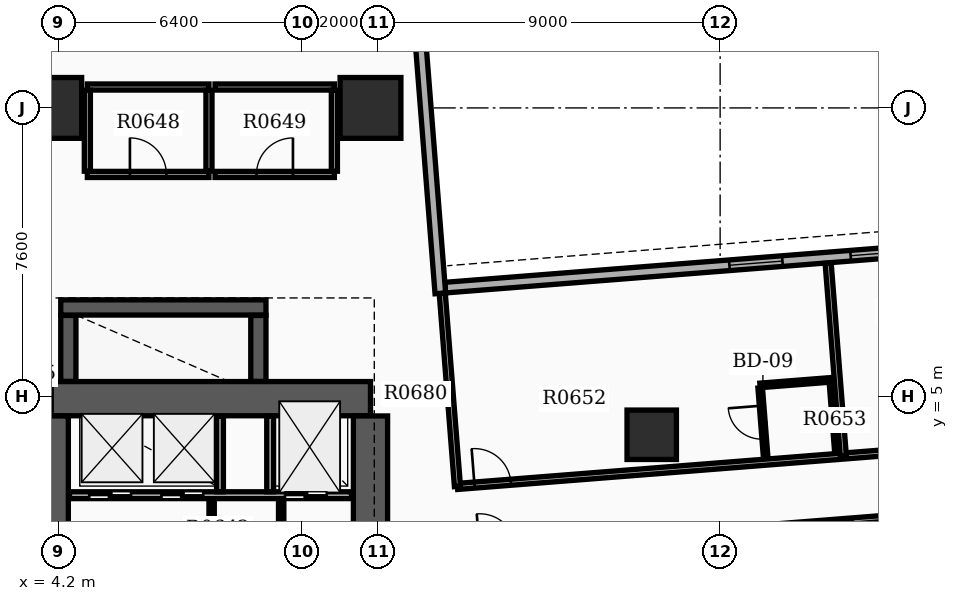
"""IFC4 building model, lengths in metres.
Left out: names, types, materials, properties, quantities, classifications, styles, units other than length and angle.
Written with IfcOpenShell. Run it as: python <this file> out.ifc"""

import sys

from ifc_helpers import new_model, si_unit, direction, frame, frame_2d, origin, origin_2d, place, context, subcontext, project, spatial, rectangle, extrude, element, fill, save


model = new_model("IFC4")
c1 = context("Model", 3, precision=1e-05, world=origin(), true_north=direction((0.0, 1.0)))
c2 = subcontext(c1, "Body", "Model", "MODEL_VIEW")
j1 = project(units=[si_unit("LENGTHUNIT", "METRE"), si_unit("PLANEANGLEUNIT", "RADIAN")], contexts=[c1])
p1 = place(None, origin())
s1 = spatial("IfcSite", under=j1, at=p1, CompositionType="ELEMENT")
p2 = place(p1, origin())
s2 = spatial("IfcBuilding", under=s1, at=p2, CompositionType="ELEMENT")
p3 = place(p2, frame((0.0, 0.0, 43.2)))
s3 = spatial("IfcBuildingStorey", under=s2, at=p3, CompositionType="ELEMENT", Elevation=43.2)
p4 = place(p3, frame((4.0, 4.95, 0.0), z_axis=(0.0, 0.0, 1.0), x_axis=(1.0, 0.0, 0.0)))
e1 = element("IfcWall", 1, at=p4, inside=s3, PredefinedType="SHEAR", context=c2, shape_type="SweptSolid", body=[
    extrude(rectangle(XDim=8.4, YDim=0.9, at=frame_2d((4.2, 0.0))), origin(), (0.0, 0.0, 1.0), 3.65),
])
p5 = place(p3, frame((4.0, -6.395, 0.0), z_axis=(0.0, 0.0, 1.0), x_axis=(0.0, 1.0, 0.0)))
e2 = element("IfcWall", 2, at=p5, inside=s3, PredefinedType="SHEAR", context=c2, shape_type="SweptSolid", body=[
    extrude(rectangle(XDim=10.89, YDim=0.9, at=frame_2d((5.445, 0.0))), origin(), (0.0, 0.0, 1.0), 3.65),
])
p6 = place(p5, frame((1.145, 0.0, 0.0)))
e3 = element("IfcOpeningElement", 3, at=p6, cuts=e2, PredefinedType="OPENING", context=c2, shape_type="SweptSolid", body=[
    extrude(rectangle(XDim=1.05, YDim=2.15, at=frame_2d((0.525, 1.075))), frame((0.0, 0.46, 0.0), z_axis=(0.0, -1.0, 0.0), x_axis=(1.0, 0.0, 0.0)), (0.0, 0.0, 1.0), 0.92),
])
p7 = place(p5, frame((6.745, 0.0, 0.0)))
e4 = element("IfcOpeningElement", 4, at=p7, cuts=e2, PredefinedType="OPENING", context=c2, shape_type="SweptSolid", body=[
    extrude(rectangle(XDim=1.05, YDim=2.15, at=frame_2d((0.525, 1.075))), frame((0.0, 0.46, 0.0), z_axis=(0.0, -1.0, 0.0), x_axis=(1.0, 0.0, 0.0)), (0.0, 0.0, 1.0), 0.92),
])
p8 = place(p3, frame((12.4, -6.395, 0.0), z_axis=(0.0, 0.0, 1.0), x_axis=(0.0, 1.0, 0.0)))
e5 = element("IfcWall", 5, at=p8, inside=s3, PredefinedType="SHEAR", context=c2, shape_type="SweptSolid", body=[
    extrude(rectangle(XDim=10.89, YDim=0.9, at=frame_2d((5.445, 0.0))), origin(), (0.0, 0.0, 1.0), 3.65),
])
p9 = place(p3, frame((4.45, 5.405, 0.0), z_axis=(0.0, 0.0, 1.0), x_axis=(0.0, 1.0, 0.0)))
e6 = element("IfcWall", 6, at=p9, inside=s3, PredefinedType="SHEAR", context=c2, shape_type="SweptSolid", body=[
    extrude(rectangle(XDim=1.735, YDim=0.4, at=frame_2d((0.867, 0.0))), origin(), (0.0, 0.0, 1.0), 3.65),
])
p10 = place(p3, frame((4.25, 7.35, 0.0), z_axis=(0.0, 0.0, 1.0), x_axis=(1.0, 0.0, 0.0)))
e7 = element("IfcWall", 7, at=p10, inside=s3, PredefinedType="SHEAR", context=c2, shape_type="SweptSolid", body=[
    extrude(rectangle(XDim=5.4, YDim=0.4, at=frame_2d((2.7, 0.0))), origin(), (0.0, 0.0, 1.0), 3.65),
])
p11 = place(p3, frame((9.45, 5.405, 0.0), z_axis=(0.0, 0.0, 1.0), x_axis=(0.0, 1.0, 0.0)))
e8 = element("IfcWall", 8, at=p11, inside=s3, PredefinedType="SHEAR", context=c2, shape_type="SweptSolid", body=[
    extrude(rectangle(XDim=1.735, YDim=0.4, at=frame_2d((0.867, 0.0))), origin(), (0.0, 0.0, 1.0), 3.65),
])
for number, where, z_axis, x_axis in (
    (9, (12.4, 12.6, 0.0), (0.0, 0.0, 1.0), (1.0, 0.0, 0.0)),
    (10, (4.0, 12.6, 0.0), (0.0, 0.0, 1.0), (1.0, 0.0, 0.0)),
):
    element("IfcColumn", number, at=place(p3, frame(where, z_axis=z_axis, x_axis=x_axis)), inside=s3, PredefinedType="COLUMN", context=c2, shape_type="SweptSolid", body=[
        extrude(rectangle(XDim=1.6, YDim=1.6, at=origin_2d()), origin(), (0.0, 0.0, 1.0), 3.9),
    ])
p12 = place(p3, frame((19.8, 4.0, 0.0), z_axis=(0.0, 0.0, 1.0), x_axis=(1.0, 0.0, 0.0)))
e11 = element("IfcColumn", 11, at=p12, inside=s3, PredefinedType="COLUMN", context=c2, shape_type="SweptSolid", body=[
    extrude(rectangle(XDim=1.3, YDim=1.3, at=origin_2d()), origin(), (0.0, 0.0, 1.0), 3.9),
])
p13 = place(p3, frame((34.405, 9.448, 0.0), z_axis=(0.0, 0.0, 1.0), x_axis=(-0.996917828963, -0.078452802979, 0.0)))
e12 = element("IfcWall", 12, at=p13, inside=s3, PredefinedType="STANDARD", context=c2, shape_type="SweptSolid", body=[
    extrude(rectangle(XDim=20.1, YDim=0.28, at=frame_2d((10.05, 0.0))), origin(), (0.0, 0.0, 1.0), 2.86),
])
p14 = place(p13, frame((1.6, 0.0, 0.8)))
e13 = element("IfcOpeningElement", 13, at=p14, cuts=e12, PredefinedType="OPENING", context=c2, shape_type="SweptSolid", body=[
    extrude(rectangle(XDim=1.4, YDim=1.6, at=frame_2d((0.7, 0.8))), frame((0.0, 0.15, 0.0), z_axis=(0.0, -1.0, 0.0), x_axis=(1.0, 0.0, 0.0)), (0.0, 0.0, 1.0), 0.3),
])
p15 = place(p13, frame((4.8, 0.0, 0.8)))
e14 = element("IfcOpeningElement", 14, at=p15, cuts=e12, PredefinedType="OPENING", context=c2, shape_type="SweptSolid", body=[
    extrude(rectangle(XDim=1.4, YDim=1.6, at=frame_2d((0.7, 0.8))), frame((0.0, 0.15, 0.0), z_axis=(0.0, -1.0, 0.0), x_axis=(1.0, 0.0, 0.0)), (0.0, 0.0, 1.0), 0.3),
])
p16 = place(p13, frame((8.0, 0.0, 0.8)))
e15 = element("IfcOpeningElement", 15, at=p16, cuts=e12, PredefinedType="OPENING", context=c2, shape_type="SweptSolid", body=[
    extrude(rectangle(XDim=1.4, YDim=1.6, at=frame_2d((0.7, 0.8))), frame((0.0, 0.15, 0.0), z_axis=(0.0, -1.0, 0.0), x_axis=(1.0, 0.0, 0.0)), (0.0, 0.0, 1.0), 0.3),
])
p17 = place(p13, frame((11.2, 0.0, 0.8)))
e16 = element("IfcOpeningElement", 16, at=p17, cuts=e12, PredefinedType="OPENING", context=c2, shape_type="SweptSolid", body=[
    extrude(rectangle(XDim=1.4, YDim=1.6, at=frame_2d((0.7, 0.8))), frame((0.0, 0.15, 0.0), z_axis=(0.0, -1.0, 0.0), x_axis=(1.0, 0.0, 0.0)), (0.0, 0.0, 1.0), 0.3),
])
p18 = place(p3, frame((14.238, 7.721, 0.0), z_axis=(0.0, 0.0, 1.0), x_axis=(-0.078438149236, 0.996918982036, 0.0)))
e17 = element("IfcWall", 17, at=p18, inside=s3, PredefinedType="STANDARD", context=c2, shape_type="SweptSolid", body=[
    extrude(rectangle(XDim=6.86, YDim=0.28, at=frame_2d((3.43, 0.0))), origin(), (0.0, 0.0, 1.0), 2.86),
])
p19 = place(p3, frame((4.48, 2.41, 0.0), z_axis=(0.0, 0.0, 1.0), x_axis=(1.0, 0.0, 0.0)))
e18 = element("IfcWall", 18, at=p19, inside=s3, PredefinedType="SOLIDWALL", context=c2, shape_type="SweptSolid", body=[
    extrude(rectangle(XDim=7.42, YDim=0.18, at=frame_2d((3.71, 0.0))), origin(), (0.0, 0.0, 1.0), 2.85),
])
p20 = place(p19, frame((5.67, 0.0, 0.0)))
e19 = element("IfcOpeningElement", 19, at=p20, cuts=e18, PredefinedType="OPENING", context=c2, shape_type="SweptSolid", body=[
    extrude(rectangle(XDim=1.1, YDim=2.15, at=frame_2d((0.55, 1.075))), frame((0.0, 0.1, 0.0), z_axis=(0.0, -1.0, 0.0), x_axis=(1.0, 0.0, 0.0)), (0.0, 0.0, 1.0), 0.2),
])
p21 = place(p19, frame((0.52, 0.0, 0.0)))
e20 = element("IfcOpeningElement", 20, at=p21, cuts=e18, PredefinedType="OPENING", context=c2, shape_type="SweptSolid", body=[
    extrude(rectangle(XDim=1.1, YDim=2.15, at=frame_2d((0.55, 1.075))), frame((0.0, 0.1, 0.0), z_axis=(0.0, -1.0, 0.0), x_axis=(1.0, 0.0, 0.0)), (0.0, 0.0, 1.0), 0.2),
])
p22 = place(p19, frame((2.42, 0.0, 0.0)))
e21 = element("IfcOpeningElement", 21, at=p22, cuts=e18, PredefinedType="OPENING", context=c2, shape_type="SweptSolid", body=[
    extrude(rectangle(XDim=1.1, YDim=2.15, at=frame_2d((0.55, 1.075))), frame((0.0, 0.1, 0.0), z_axis=(0.0, -1.0, 0.0), x_axis=(1.0, 0.0, 0.0)), (0.0, 0.0, 1.0), 0.2),
])
for number, where, z_axis, x_axis in (
    (22, (8.44, 2.5, 0.0), (0.0, 0.0, 1.0), (0.0, 1.0, 0.0)),
    (23, (9.76, 2.5, 0.0), (0.0, 0.0, 1.0), (0.0, 1.0, 0.0)),
):
    element("IfcWall", number, at=place(p3, frame(where, z_axis=z_axis, x_axis=x_axis)), inside=s3, PredefinedType="SOLIDWALL", context=c2, shape_type="SweptSolid", body=[
        extrude(rectangle(XDim=1.99, YDim=0.18, at=frame_2d((0.995, 0.0))), origin(), (0.0, 0.0, 1.0), 2.85),
    ])
p23 = place(p3, frame((8.22, -0.65, 0.0), z_axis=(0.0, 0.0, 1.0), x_axis=(0.0, 1.0, 0.0)))
e24 = element("IfcWall", 24, at=p23, inside=s3, PredefinedType="SOLIDWALL", context=c2, shape_type="SweptSolid", body=[
    extrude(rectangle(XDim=2.96, YDim=0.14, at=frame_2d((1.48, 0.0))), origin(), (0.0, 0.0, 1.0), 2.85),
])
p24 = place(p23, frame((0.55, 0.0, 0.0)))
e25 = element("IfcOpeningElement", 25, at=p24, cuts=e24, PredefinedType="OPENING", context=c2, shape_type="SweptSolid", body=[
    extrude(rectangle(XDim=0.88, YDim=2.1, at=frame_2d((0.44, 1.05))), frame((0.0, 0.08, 0.0), z_axis=(0.0, -1.0, 0.0), x_axis=(1.0, 0.0, 0.0)), (0.0, 0.0, 1.0), 0.16),
])
p25 = place(p3, frame((10.05, -0.652, 0.0), z_axis=(0.0, 0.0, 1.0), x_axis=(0.0, 1.0, 0.0)))
e26 = element("IfcWall", 26, at=p25, inside=s3, PredefinedType="PARTITIONING", context=c2, shape_type="SweptSolid", body=[
    extrude(rectangle(XDim=2.962, YDim=0.14, at=frame_2d((1.481, 0.0))), origin(), (0.0, 0.0, 1.0), 2.85),
])
p26 = place(p25, frame((0.85, 0.0, 0.0)))
e27 = element("IfcOpeningElement", 27, at=p26, cuts=e26, PredefinedType="OPENING", context=c2, shape_type="SweptSolid", body=[
    extrude(rectangle(XDim=0.88, YDim=2.1, at=frame_2d((0.44, 1.05))), frame((0.0, 0.08, 0.0), z_axis=(0.0, -1.0, 0.0), x_axis=(1.0, 0.0, 0.0)), (0.0, 0.0, 1.0), 0.16),
])
p27 = place(p3, frame((4.95, 10.85, 0.0), z_axis=(0.0, 0.0, 1.0), x_axis=(1.0, 0.0, 0.0)))
e28 = element("IfcWall", 28, at=p27, inside=s3, PredefinedType="PARTITIONING", context=c2, shape_type="SweptSolid", body=[
    extrude(rectangle(XDim=3.2, YDim=0.16, at=frame_2d((1.6, 0.0))), origin(), (0.0, 0.0, 1.0), 2.85),
])
p28 = place(p27, frame((1.12, 0.0, 0.0)))
e29 = element("IfcOpeningElement", 29, at=p28, cuts=e28, PredefinedType="OPENING", context=c2, shape_type="SweptSolid", body=[
    extrude(rectangle(XDim=0.96, YDim=2.15, at=frame_2d((0.48, 1.075))), frame((0.0, 0.09, 0.0), z_axis=(0.0, -1.0, 0.0), x_axis=(1.0, 0.0, 0.0)), (0.0, 0.0, 1.0), 0.18),
])
p29 = place(p3, frame((4.95, 13.15, 0.0), z_axis=(0.0, 0.0, 1.0), x_axis=(1.0, 0.0, 0.0)))
e30 = element("IfcWall", 30, at=p29, inside=s3, PredefinedType="PARTITIONING", context=c2, shape_type="SweptSolid", body=[
    extrude(rectangle(XDim=3.2, YDim=0.16, at=frame_2d((1.6, 0.0))), origin(), (0.0, 0.0, 1.0), 2.85),
])
for number, where, z_axis, x_axis in (
    (31, (4.95, 10.935, 0.0), (0.0, 0.0, 1.0), (0.0, 1.0, 0.0)),
    (32, (8.15, 10.935, 0.0), (0.0, 0.0, 1.0), (0.0, 1.0, 0.0)),
):
    element("IfcWall", number, at=place(p3, frame(where, z_axis=z_axis, x_axis=x_axis)), inside=s3, PredefinedType="PARTITIONING", context=c2, shape_type="SweptSolid", body=[
        extrude(rectangle(XDim=2.13, YDim=0.16, at=frame_2d((1.065, 0.0))), origin(), (0.0, 0.0, 1.0), 2.85),
    ])
p30 = place(p3, frame((8.31, 10.85, 0.0), z_axis=(0.0, 0.0, 1.0), x_axis=(1.0, 0.0, 0.0)))
e33 = element("IfcWall", 33, at=p30, inside=s3, PredefinedType="PARTITIONING", context=c2, shape_type="SweptSolid", body=[
    extrude(rectangle(XDim=3.14, YDim=0.16, at=frame_2d((1.57, 0.0))), origin(), (0.0, 0.0, 1.0), 2.85),
])
p31 = place(p30, frame((1.09, 0.0, 0.0)))
e34 = element("IfcOpeningElement", 34, at=p31, cuts=e33, PredefinedType="OPENING", context=c2, shape_type="SweptSolid", body=[
    extrude(rectangle(XDim=0.96, YDim=2.15, at=frame_2d((0.48, 1.075))), frame((0.0, 0.09, 0.0), z_axis=(0.0, -1.0, 0.0), x_axis=(1.0, 0.0, 0.0)), (0.0, 0.0, 1.0), 0.18),
])
p32 = place(p3, frame((8.31, 13.15, 0.0), z_axis=(0.0, 0.0, 1.0), x_axis=(1.0, 0.0, 0.0)))
e35 = element("IfcWall", 35, at=p32, inside=s3, PredefinedType="PARTITIONING", context=c2, shape_type="SweptSolid", body=[
    extrude(rectangle(XDim=3.14, YDim=0.16, at=frame_2d((1.57, 0.0))), origin(), (0.0, 0.0, 1.0), 2.85),
])
p33 = place(p3, frame((11.45, 10.935, 0.0), z_axis=(0.0, 0.0, 1.0), x_axis=(0.0, 1.0, 0.0)))
e36 = element("IfcWall", 36, at=p33, inside=s3, PredefinedType="PARTITIONING", context=c2, shape_type="SweptSolid", body=[
    extrude(rectangle(XDim=2.13, YDim=0.16, at=frame_2d((1.065, 0.0))), origin(), (0.0, 0.0, 1.0), 2.85),
])
p34 = place(p3, frame((14.688, 2.641, 0.0), z_axis=(0.0, 0.0, 1.0), x_axis=(0.996917226209, 0.078460461943, 0.0)))
e37 = element("IfcWall", 37, at=p34, inside=s3, PredefinedType="PARTITIONING", context=c2, shape_type="SweptSolid", body=[
    extrude(rectangle(XDim=20.182, YDim=0.16, at=frame_2d((10.091, 0.0))), origin(), (0.0, 0.0, 1.0), 2.85),
])
p35 = place(p34, frame((0.45, 0.0, 0.0)))
e38 = element("IfcOpeningElement", 38, at=p35, cuts=e37, PredefinedType="OPENING", context=c2, shape_type="SweptSolid", body=[
    extrude(rectangle(XDim=0.96, YDim=2.15, at=frame_2d((0.48, 1.075))), frame((0.0, 0.09, 0.0), z_axis=(0.0, -1.0, 0.0), x_axis=(1.0, 0.0, 0.0)), (0.0, 0.0, 1.0), 0.18),
])
p36 = place(p34, frame((16.268, 0.0, 0.0)))
e39 = element("IfcOpeningElement", 39, at=p36, cuts=e37, PredefinedType="OPENING", context=c2, shape_type="SweptSolid", body=[
    extrude(rectangle(XDim=0.96, YDim=2.15, at=frame_2d((0.48, 1.075))), frame((0.0, 0.09, 0.0), z_axis=(0.0, -1.0, 0.0), x_axis=(1.0, 0.0, 0.0)), (0.0, 0.0, 1.0), 0.18),
])
p37 = place(p3, frame((14.688, 2.641, 0.0), z_axis=(0.0, 0.0, 1.0), x_axis=(-0.078441660381, 0.996918705771, 0.0)))
e40 = element("IfcWall", 40, at=p37, inside=s3, PredefinedType="PARTITIONING", context=c2, shape_type="SweptSolid", body=[
    extrude(rectangle(XDim=5.092, YDim=0.16, at=frame_2d((2.546, 0.0))), origin(), (0.0, 0.0, 1.0), 2.85),
])
p38 = place(p3, frame((24.842, 3.44, 0.0), z_axis=(0.0, 0.0, 1.0), x_axis=(-0.078485560772, 0.996915250536, 0.0)))
e41 = element("IfcWall", 41, at=p38, inside=s3, PredefinedType="PARTITIONING", context=c2, shape_type="SweptSolid", body=[
    extrude(rectangle(XDim=5.092, YDim=0.16, at=frame_2d((2.546, 0.0))), origin(), (0.0, 0.0, 1.0), 2.85),
])
p39 = place(p3, frame((22.797, 3.419, 0.0), z_axis=(0.0, 0.0, 1.0), x_axis=(-0.0784709492, 0.996916400774, 0.0)))
e42 = element("IfcWall", 42, at=p39, inside=s3, PredefinedType="PARTITIONING", context=c2, shape_type="SweptSolid", body=[
    extrude(rectangle(XDim=1.82, YDim=0.12, at=frame_2d((0.91, 0.0))), origin(), (0.0, 0.0, 1.0), 2.85),
])
p40 = place(p39, frame((0.47, 0.0, 0.0)))
e43 = element("IfcOpeningElement", 43, at=p40, cuts=e42, PredefinedType="OPENING", context=c2, shape_type="SweptSolid", body=[
    extrude(rectangle(XDim=0.88, YDim=2.1, at=frame_2d((0.44, 1.05))), frame((0.0, 0.07, 0.0), z_axis=(0.0, -1.0, 0.0), x_axis=(1.0, 0.0, 0.0)), (0.0, 0.0, 1.0), 0.14),
])
p41 = place(p3, frame((24.671, 3.567, 0.0), z_axis=(0.0, 0.0, 1.0), x_axis=(-0.0784709492, 0.996916400774, 0.0)))
e44 = element("IfcWall", 44, at=p41, inside=s3, PredefinedType="PARTITIONING", context=c2, shape_type="SweptSolid", body=[
    extrude(rectangle(XDim=1.82, YDim=0.12, at=frame_2d((0.91, 0.0))), origin(), (0.0, 0.0, 1.0), 2.85),
])
p42 = place(p3, frame((22.649, 5.298, 0.0), z_axis=(0.0, 0.0, 1.0), x_axis=(0.99691849475, 0.078444342213, 0.0)))
e45 = element("IfcWall", 45, at=p42, inside=s3, PredefinedType="PARTITIONING", context=c2, shape_type="SweptSolid", body=[
    extrude(rectangle(XDim=1.88, YDim=0.12, at=frame_2d((0.94, 0.0))), origin(), (0.0, 0.0, 1.0), 2.85),
])
p43 = place(p3, frame((14.823, 0.926, 0.0), z_axis=(0.0, 0.0, 1.0), x_axis=(0.996917226209, 0.078460461943, 0.0)))
e46 = element("IfcWall", 46, at=p43, inside=s3, PredefinedType="PARTITIONING", context=c2, shape_type="SweptSolid", body=[
    extrude(rectangle(XDim=20.182, YDim=0.16, at=frame_2d((10.091, 0.0))), origin(), (0.0, 0.0, 1.0), 2.85),
])
p44 = place(p43, frame((0.45, 0.0, 0.0)))
e47 = element("IfcOpeningElement", 47, at=p44, cuts=e46, PredefinedType="OPENING", context=c2, shape_type="SweptSolid", body=[
    extrude(rectangle(XDim=0.96, YDim=2.15, at=frame_2d((0.48, 1.075))), frame((0.0, 0.09, 0.0), z_axis=(0.0, -1.0, 0.0), x_axis=(1.0, 0.0, 0.0)), (0.0, 0.0, 1.0), 0.18),
])
p45 = place(p43, frame((16.268, 0.0, 0.0)))
e48 = element("IfcOpeningElement", 48, at=p45, cuts=e46, PredefinedType="OPENING", context=c2, shape_type="SweptSolid", body=[
    extrude(rectangle(XDim=0.96, YDim=2.15, at=frame_2d((0.48, 1.075))), frame((0.0, 0.09, 0.0), z_axis=(0.0, -1.0, 0.0), x_axis=(1.0, 0.0, 0.0)), (0.0, 0.0, 1.0), 0.18),
])
p46 = place(p3, frame((24.977, 1.725, 0.0), z_axis=(0.0, 0.0, 1.0), x_axis=(0.07842417411, -0.996920081509, 0.0)))
e49 = element("IfcWall", 49, at=p46, inside=s3, PredefinedType="PARTITIONING", context=c2, shape_type="SweptSolid", body=[
    extrude(rectangle(XDim=6.332, YDim=0.16, at=frame_2d((3.166, 0.0))), origin(), (0.0, 0.0, 1.0), 2.85),
])
p47 = place(p16, origin())
e50 = element("IfcWindow", 50, at=p47, inside=s3, PartitioningType="SINGLE_PANEL", PredefinedType="WINDOW", context=c2, shape_type="SweptSolid", body=[
    extrude(rectangle(XDim=1.4, YDim=1.6, at=frame_2d((0.7, 0.8))), frame((0.0, 0.03, 0.0), z_axis=(0.0, -1.0, 0.0), x_axis=(1.0, 0.0, 0.0)), (0.0, 0.0, 1.0), 0.06),
])
fill(e15, e50)
p48 = place(p17, origin())
e51 = element("IfcWindow", 51, at=p48, inside=s3, PartitioningType="SINGLE_PANEL", PredefinedType="WINDOW", context=c2, shape_type="SweptSolid", body=[
    extrude(rectangle(XDim=1.4, YDim=1.6, at=frame_2d((0.7, 0.8))), frame((0.0, 0.03, 0.0), z_axis=(0.0, -1.0, 0.0), x_axis=(1.0, 0.0, 0.0)), (0.0, 0.0, 1.0), 0.06),
])
fill(e16, e51)
p49 = place(p20, origin())
e52 = element("IfcDoor", 52, at=p49, inside=s3, OperationType="DOUBLE_DOOR_SLIDING", PredefinedType="DOOR", context=c2, shape_type="SweptSolid", body=[
    extrude(rectangle(XDim=1.1, YDim=2.15, at=frame_2d((0.55, 1.075))), frame((0.0, 0.025, 0.0), z_axis=(0.0, -1.0, 0.0), x_axis=(1.0, 0.0, 0.0)), (0.0, 0.0, 1.0), 0.05),
])
fill(e19, e52)
p50 = place(p21, origin())
e53 = element("IfcDoor", 53, at=p50, inside=s3, OperationType="DOUBLE_DOOR_SLIDING", PredefinedType="DOOR", context=c2, shape_type="SweptSolid", body=[
    extrude(rectangle(XDim=1.1, YDim=2.15, at=frame_2d((0.55, 1.075))), frame((0.0, 0.025, 0.0), z_axis=(0.0, -1.0, 0.0), x_axis=(1.0, 0.0, 0.0)), (0.0, 0.0, 1.0), 0.05),
])
fill(e20, e53)
p51 = place(p22, origin())
e54 = element("IfcDoor", 54, at=p51, inside=s3, OperationType="DOUBLE_DOOR_SLIDING", PredefinedType="DOOR", context=c2, shape_type="SweptSolid", body=[
    extrude(rectangle(XDim=1.1, YDim=2.15, at=frame_2d((0.55, 1.075))), frame((0.0, 0.025, 0.0), z_axis=(0.0, -1.0, 0.0), x_axis=(1.0, 0.0, 0.0)), (0.0, 0.0, 1.0), 0.05),
])
fill(e21, e54)
p52 = place(p28, origin())
e55 = element("IfcDoor", 55, at=p52, inside=s3, OperationType="SINGLE_SWING_LEFT", PredefinedType="DOOR", context=c2, shape_type="SweptSolid", body=[
    extrude(rectangle(XDim=0.96, YDim=2.15, at=frame_2d((0.48, 1.075))), frame((0.0, 0.025, 0.0), z_axis=(0.0, -1.0, 0.0), x_axis=(1.0, 0.0, 0.0)), (0.0, 0.0, 1.0), 0.05),
])
fill(e29, e55)
p53 = place(p31, origin())
e56 = element("IfcDoor", 56, at=p53, inside=s3, OperationType="SINGLE_SWING_RIGHT", PredefinedType="DOOR", context=c2, shape_type="SweptSolid", body=[
    extrude(rectangle(XDim=0.96, YDim=2.15, at=frame_2d((0.48, 1.075))), frame((0.0, 0.025, 0.0), z_axis=(0.0, -1.0, 0.0), x_axis=(1.0, 0.0, 0.0)), (0.0, 0.0, 1.0), 0.05),
])
fill(e34, e56)
p54 = place(p35, origin())
e57 = element("IfcDoor", 57, at=p54, inside=s3, OperationType="SINGLE_SWING_LEFT", PredefinedType="DOOR", context=c2, shape_type="SweptSolid", body=[
    extrude(rectangle(XDim=0.96, YDim=2.15, at=frame_2d((0.48, 1.075))), frame((0.0, 0.025, 0.0), z_axis=(0.0, -1.0, 0.0), x_axis=(1.0, 0.0, 0.0)), (0.0, 0.0, 1.0), 0.05),
])
fill(e38, e57)
p55 = place(p40, origin())
e58 = element("IfcDoor", 58, at=p55, inside=s3, OperationType="SINGLE_SWING_RIGHT", PredefinedType="DOOR", context=c2, shape_type="SweptSolid", body=[
    extrude(rectangle(XDim=0.88, YDim=2.1, at=frame_2d((0.44, 1.05))), frame((0.0, 0.025, 0.0), z_axis=(0.0, -1.0, 0.0), x_axis=(1.0, 0.0, 0.0)), (0.0, 0.0, 1.0), 0.05),
])
fill(e43, e58)
save(model, sys.argv[1])
